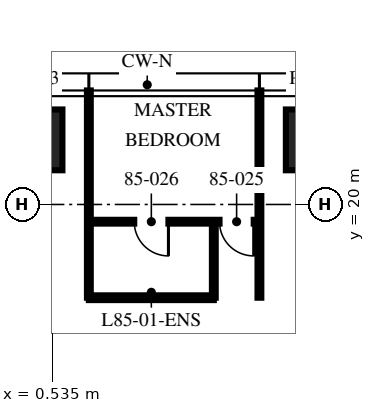
"""IFC4 building model, lengths in metres.
Left out: names, types, materials, properties, quantities, classifications, styles, units other than length and angle.
Written with IfcOpenShell. Run it as: python <this file> out.ifc"""

import sys

from ifc_helpers import new_model, si_unit, direction, frame, frame_2d, origin, origin_2d, place, context, subcontext, project, spatial, rectangle, extrude, element, fill, save


model = new_model("IFC4")
c1 = context("Model", 3, precision=1e-05, world=origin(), true_north=direction((0.0, 1.0)))
c2 = subcontext(c1, "Body", "Model", "MODEL_VIEW")
j1 = project(units=[si_unit("LENGTHUNIT", "METRE"), si_unit("PLANEANGLEUNIT", "RADIAN")], contexts=[c1])
p1 = place(None, origin())
s1 = spatial("IfcSite", under=j1, at=p1, CompositionType="ELEMENT")
p2 = place(p1, origin())
s2 = spatial("IfcBuilding", under=s1, at=p2, CompositionType="ELEMENT")
p3 = place(p2, frame((0.0, 0.0, 338.25)))
s3 = spatial("IfcBuildingStorey", under=s2, at=p3, CompositionType="ELEMENT", Elevation=338.25)
for number, where, z_axis, x_axis in (
    (1, (0.0, 21.7, 0.0), (0.0, 0.0, 1.0), (1.0, 0.0, 0.0)),
    (2, (7.48, 21.7, 0.0), (0.0, 0.0, 1.0), (1.0, 0.0, 0.0)),
):
    element("IfcColumn", number, at=place(p3, frame(where, z_axis=z_axis, x_axis=x_axis)), inside=s3, PredefinedType="COLUMN", context=c2, shape_type="SweptSolid", body=[
        extrude(rectangle(XDim=1.6, YDim=1.6, at=origin_2d()), origin(), (0.0, 0.0, 1.0), 3.75),
    ])
for number, where, z_axis, x_axis in (
    (3, (5.984, 17.546, 0.0), (0.0, 0.0, 1.0), (0.0, 1.0, 0.0)),
    (4, (1.496, 17.546, 0.0), (0.0, 0.0, 1.0), (0.0, 1.0, 0.0)),
):
    element("IfcWall", number, at=place(p3, frame(where, z_axis=z_axis, x_axis=x_axis)), inside=s3, PredefinedType="PARTITIONING", context=c2, shape_type="SweptSolid", body=[
        extrude(rectangle(XDim=5.454, YDim=0.1, at=frame_2d((2.727, 0.0))), origin(), (0.0, 0.0, 1.0), 3.01),
    ])
p4 = place(p3, frame((5.984, 19.546, 0.0), z_axis=(0.0, 0.0, 1.0), x_axis=(-1.0, 0.0, 0.0)))
e5 = element("IfcWall", 5, at=p4, inside=s3, PredefinedType="PARTITIONING", context=c2, shape_type="SweptSolid", body=[
    extrude(rectangle(XDim=4.488, YDim=0.1, at=frame_2d((2.244, 0.0))), origin(), (0.0, 0.0, 1.0), 2.91),
])
p5 = place(p4, frame((0.15, 0.0, 0.0)))
e6 = element("IfcOpeningElement", 6, at=p5, cuts=e5, PredefinedType="OPENING", context=c2, shape_type="SweptSolid", body=[
    extrude(rectangle(XDim=0.9, YDim=2.1, at=frame_2d((0.45, 1.05))), frame((0.0, 0.06, 0.0), z_axis=(0.0, -1.0, 0.0), x_axis=(1.0, 0.0, 0.0)), (0.0, 0.0, 1.0), 0.12),
])
p6 = place(p4, frame((2.394, 0.0, 0.0)))
e7 = element("IfcOpeningElement", 7, at=p6, cuts=e5, PredefinedType="OPENING", context=c2, shape_type="SweptSolid", body=[
    extrude(rectangle(XDim=0.9, YDim=2.1, at=frame_2d((0.45, 1.05))), frame((0.0, 0.06, 0.0), z_axis=(0.0, -1.0, 0.0), x_axis=(1.0, 0.0, 0.0)), (0.0, 0.0, 1.0), 0.12),
])
p7 = place(p3, frame((4.784, 17.546, 0.0), z_axis=(0.0, 0.0, 1.0), x_axis=(0.0, 1.0, 0.0)))
e8 = element("IfcWall", 8, at=p7, inside=s3, PredefinedType="PARTITIONING", context=c2, shape_type="SweptSolid", body=[
    extrude(rectangle(XDim=2.0, YDim=0.1, at=frame_2d((1.0, 0.0))), origin(), (0.0, 0.0, 1.0), 3.5),
])
p8 = place(p3, frame((4.784, 17.546, 0.0), z_axis=(0.0, 0.0, 1.0), x_axis=(-1.0, 0.0, 0.0)))
e9 = element("IfcWall", 9, at=p8, inside=s3, PredefinedType="PARTITIONING", context=c2, shape_type="SweptSolid", body=[
    extrude(rectangle(XDim=3.288, YDim=0.125, at=frame_2d((1.644, 0.0))), origin(), (0.0, 0.0, 1.0), 2.91),
])
p9 = place(p5, origin())
e10 = element("IfcDoor", 10, at=p9, inside=s3, OperationType="SINGLE_SWING_LEFT", PredefinedType="DOOR", context=c2, shape_type="SweptSolid", body=[
    extrude(rectangle(XDim=0.9, YDim=2.1, at=frame_2d((0.45, 1.05))), frame((0.0, 0.025, 0.0), z_axis=(0.0, -1.0, 0.0), x_axis=(1.0, 0.0, 0.0)), (0.0, 0.0, 1.0), 0.05),
])
fill(e6, e10)
p10 = place(p6, origin())
e11 = element("IfcDoor", 11, at=p10, inside=s3, OperationType="SINGLE_SWING_LEFT", PredefinedType="DOOR", context=c2, shape_type="SweptSolid", body=[
    extrude(rectangle(XDim=0.9, YDim=2.1, at=frame_2d((0.45, 1.05))), frame((0.0, 0.025, 0.0), z_axis=(0.0, -1.0, 0.0), x_axis=(1.0, 0.0, 0.0)), (0.0, 0.0, 1.0), 0.05),
])
fill(e7, e11)
save(model, sys.argv[1])
